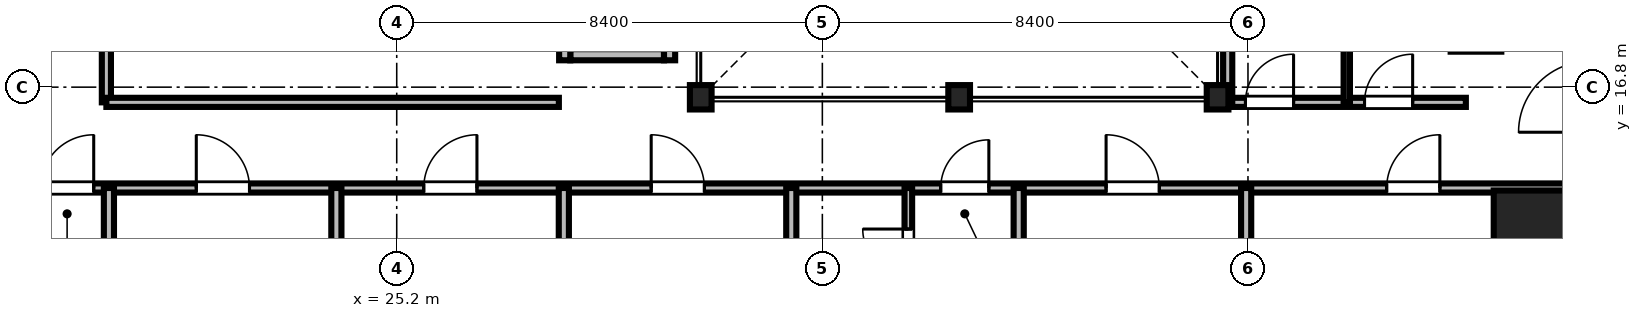
"""IFC4 building model, lengths in metres.
Left out: names, types, materials, properties, quantities, classifications, styles, units other than length and angle.
Written with IfcOpenShell. Run it as: python <this file> out.ifc"""

import sys

from ifc_helpers import new_model, si_unit, direction, frame, frame_2d, origin, origin_2d, place, context, subcontext, project, spatial, rectangle, i_section, extrude, source, transform, mapped, element, fill, save


model = new_model("IFC4")
c1 = context("Model", 3, precision=1e-05, world=origin(), true_north=direction((0.0, 1.0)))
c2 = subcontext(c1, "Body", "Model", "MODEL_VIEW")
j1 = project(units=[si_unit("LENGTHUNIT", "METRE"), si_unit("PLANEANGLEUNIT", "RADIAN")], contexts=[c1])
p1 = place(None, origin())
s1 = spatial("IfcSite", under=j1, at=p1, CompositionType="ELEMENT")
p2 = place(p1, origin())
s2 = spatial("IfcBuilding", under=s1, at=p2, CompositionType="ELEMENT")
p3 = place(p2, frame((0.0, 0.0, 86.0)))
s3 = spatial("IfcBuildingStorey", under=s2, at=p3, CompositionType="ELEMENT", Elevation=86.0)
m1 = source(origin(), c2, "Body", "SweptSolid", [
    extrude(i_section(OverallWidth=0.428, OverallDepth=0.481, WebThickness=0.04, FlangeThickness=0.063, FilletRadius=0.015, at=origin_2d()), origin(), (0.0, 0.0, 1.0), 3.41),
])
for number, where, z_axis, x_axis in (
    (1, (31.2, 16.6, 0.0), (0.0, 0.0, 1.0), (1.0, 0.0, 0.0)),
    (2, (36.3, 16.6, 0.0), (0.0, 0.0, 1.0), (1.0, 0.0, 0.0)),
    (3, (41.4, 16.6, 0.0), (0.0, 0.0, 1.0), (1.0, 0.0, 0.0)),
):
    element("IfcColumn", number, at=place(p3, frame(where, z_axis=z_axis, x_axis=x_axis)), inside=s3, PredefinedType="COLUMN", context=c2, shape_type="MappedRepresentation", body=[
        mapped(m1, transform((0.0, 0.0, 0.0), scale=1.0)),
    ])
m2 = source(origin(), c2, "Body", "SweptSolid", [
    extrude(rectangle(XDim=1.8, YDim=1.8, at=origin_2d()), origin(), (0.0, 0.0, 1.0), 3.41),
])
p4 = place(p3, frame((47.75, 13.86, 0.0), z_axis=(0.0, 0.0, 1.0), x_axis=(1.0, 0.0, 0.0)))
e4 = element("IfcColumn", 4, at=p4, inside=s3, PredefinedType="COLUMN", context=c2, shape_type="MappedRepresentation", body=[
    mapped(m2, transform((0.0, 0.0, 0.0), scale=1.0)),
])
m3 = source(origin(), c2, "Body", "SweptSolid", [
    extrude(rectangle(XDim=1.85, YDim=0.22, at=frame_2d((0.925, 0.0))), origin(), (0.0, 0.0, 1.0), 3.41),
])
p5 = place(p3, frame((28.625, 17.44, 0.0), z_axis=(0.0, 0.0, 1.0), x_axis=(1.0, 0.0, 0.0)))
e5 = element("IfcWall", 5, at=p5, inside=s3, PredefinedType="SOLIDWALL", context=c2, shape_type="MappedRepresentation", body=[
    mapped(m3, transform((0.0, 0.0, 0.0), scale=1.0)),
])
m4 = source(origin(), c2, "Body", "SweptSolid", [
    extrude(rectangle(XDim=2.54, YDim=0.22, at=frame_2d((1.27, 0.0))), origin(), (0.0, 0.0, 1.0), 3.41),
])
for number, where, z_axis, x_axis in (
    (6, (28.515, 17.33, 0.0), (0.0, 0.0, 1.0), (0.0, 1.0, 0.0)),
    (7, (30.585, 17.33, 0.0), (0.0, 0.0, 1.0), (0.0, 1.0, 0.0)),
):
    element("IfcWall", number, at=place(p3, frame(where, z_axis=z_axis, x_axis=x_axis)), inside=s3, PredefinedType="SOLIDWALL", context=c2, shape_type="MappedRepresentation", body=[
        mapped(m4, transform((0.0, 0.0, 0.0), scale=1.0)),
    ])
m5 = source(origin(), c2, "Body", "SweptSolid", [
    extrude(rectangle(XDim=46.156, YDim=0.18, at=frame_2d((23.078, 0.0))), origin(), (0.0, 0.0, 1.0), 2.652),
])
p6 = place(p3, frame((2.422, 14.81, 0.0), z_axis=(0.0, 0.0, 1.0), x_axis=(1.0, 0.0, 0.0)))
e8 = element("IfcWall", 8, at=p6, inside=s3, PredefinedType="PARTITIONING", context=c2, shape_type="MappedRepresentation", body=[
    mapped(m5, transform((0.0, 0.0, 0.0), scale=1.0)),
])
m6 = source(origin(), c2, "Body", "SweptSolid", [
    extrude(rectangle(XDim=1.05, YDim=2.2, at=frame_2d((0.525, 1.1))), frame((0.0, 0.1, 0.0), z_axis=(0.0, -1.0, 0.0), x_axis=(1.0, 0.0, 0.0)), (0.0, 0.0, 1.0), 0.2),
])
p7 = place(p6, frame((15.748, 0.0, 0.0)))
e9 = element("IfcOpeningElement", 9, at=p7, cuts=e8, PredefinedType="OPENING", context=c2, shape_type="MappedRepresentation", body=[
    mapped(m6, transform((0.0, 0.0, 0.0), scale=1.0)),
])
p8 = place(p6, frame((18.823, 0.0, 0.0)))
e10 = element("IfcOpeningElement", 10, at=p8, cuts=e8, PredefinedType="OPENING", context=c2, shape_type="MappedRepresentation", body=[
    mapped(m6, transform((0.0, 0.0, 0.0), scale=1.0)),
])
p9 = place(p6, frame((23.311, 0.0, 0.0)))
e11 = element("IfcOpeningElement", 11, at=p9, cuts=e8, PredefinedType="OPENING", context=c2, shape_type="MappedRepresentation", body=[
    mapped(m6, transform((0.0, 0.0, 0.0), scale=1.0)),
])
p10 = place(p6, frame((27.8, 0.0, 0.0)))
e12 = element("IfcOpeningElement", 12, at=p10, cuts=e8, PredefinedType="OPENING", context=c2, shape_type="MappedRepresentation", body=[
    mapped(m6, transform((0.0, 0.0, 0.0), scale=1.0)),
])
m7 = source(origin(), c2, "Body", "SweptSolid", [
    extrude(rectangle(XDim=0.95, YDim=2.15, at=frame_2d((0.475, 1.075))), frame((0.0, 0.1, 0.0), z_axis=(0.0, -1.0, 0.0), x_axis=(1.0, 0.0, 0.0)), (0.0, 0.0, 1.0), 0.2),
])
p11 = place(p6, frame((33.514, 0.0, 0.0)))
e13 = element("IfcOpeningElement", 13, at=p11, cuts=e8, PredefinedType="OPENING", context=c2, shape_type="MappedRepresentation", body=[
    mapped(m7, transform((0.0, 0.0, 0.0), scale=1.0)),
])
p12 = place(p6, frame((36.778, 0.0, 0.0)))
e14 = element("IfcOpeningElement", 14, at=p12, cuts=e8, PredefinedType="OPENING", context=c2, shape_type="MappedRepresentation", body=[
    mapped(m6, transform((0.0, 0.0, 0.0), scale=1.0)),
])
p13 = place(p6, frame((42.315, 0.0, 0.0)))
e15 = element("IfcOpeningElement", 15, at=p13, cuts=e8, PredefinedType="OPENING", context=c2, shape_type="MappedRepresentation", body=[
    mapped(m6, transform((0.0, 0.0, 0.0), scale=1.0)),
])
m8 = source(origin(), c2, "Body", "SweptSolid", [
    extrude(rectangle(XDim=5.4, YDim=0.18, at=frame_2d((2.7, 0.0))), origin(), (0.0, 0.0, 1.0), 2.802),
])
p14 = place(p3, frame((19.47, 16.5, 0.0), z_axis=(0.0, 0.0, 1.0), x_axis=(0.0, 1.0, 0.0)))
e16 = element("IfcWall", 16, at=p14, inside=s3, PredefinedType="PARTITIONING", context=c2, shape_type="MappedRepresentation", body=[
    mapped(m8, transform((0.0, 0.0, 0.0), scale=1.0)),
])
p15 = place(p14, frame((2.0, 0.0, 0.0)))
e17 = element("IfcOpeningElement", 17, at=p15, cuts=e16, PredefinedType="OPENING", context=c2, shape_type="MappedRepresentation", body=[
    mapped(m6, transform((0.0, 0.0, 0.0), scale=1.0)),
])
m9 = source(origin(), c2, "Body", "SweptSolid", [
    extrude(rectangle(XDim=4.7, YDim=0.18, at=frame_2d((2.35, 0.0))), origin(), (0.0, 0.0, 1.0), 2.802),
])
p16 = place(p3, frame((41.6, 16.5, 0.0), z_axis=(0.0, 0.0, 1.0), x_axis=(1.0, 0.0, 0.0)))
e18 = element("IfcWall", 18, at=p16, inside=s3, PredefinedType="PARTITIONING", context=c2, shape_type="MappedRepresentation", body=[
    mapped(m9, transform((0.0, 0.0, 0.0), scale=1.0)),
])
p17 = place(p16, frame((0.35, 0.0, 0.0)))
e19 = element("IfcOpeningElement", 19, at=p17, cuts=e18, PredefinedType="OPENING", context=c2, shape_type="MappedRepresentation", body=[
    mapped(m7, transform((0.0, 0.0, 0.0), scale=1.0)),
])
p18 = place(p16, frame((2.7, 0.0, 0.0)))
e20 = element("IfcOpeningElement", 20, at=p18, cuts=e18, PredefinedType="OPENING", context=c2, shape_type="MappedRepresentation", body=[
    mapped(m7, transform((0.0, 0.0, 0.0), scale=1.0)),
])
m10 = source(origin(), c2, "Body", "SweptSolid", [
    extrude(rectangle(XDim=2.36, YDim=0.15, at=frame_2d((1.18, 0.0))), origin(), (0.0, 0.0, 1.0), 2.802),
])
p19 = place(p3, frame((35.297, 12.45, 0.0), z_axis=(0.0, 0.0, 1.0), x_axis=(0.0, 1.0, 0.0)))
e21 = element("IfcWall", 21, at=p19, inside=s3, PredefinedType="PARTITIONING", context=c2, shape_type="MappedRepresentation", body=[
    mapped(m10, transform((0.0, 0.0, 0.0), scale=1.0)),
])
m11 = source(origin(), c2, "Body", "SweptSolid", [
    extrude(rectangle(XDim=0.9, YDim=2.1, at=frame_2d((0.45, 1.05))), frame((0.0, 0.085, 0.0), z_axis=(0.0, -1.0, 0.0), x_axis=(1.0, 0.0, 0.0)), (0.0, 0.0, 1.0), 0.17),
])
p20 = place(p19, frame((0.65, 0.0, 0.0)))
e22 = element("IfcOpeningElement", 22, at=p20, cuts=e21, PredefinedType="OPENING", context=c2, shape_type="MappedRepresentation", body=[
    mapped(m11, transform((0.0, 0.0, 0.0), scale=1.0)),
])
m12 = source(origin(), c2, "Body", "SweptSolid", [
    extrude(rectangle(XDim=12.688, YDim=0.2, at=frame_2d((6.344, 0.0))), origin(), (0.0, 0.0, 1.0), 2.652),
])
p21 = place(p3, frame((19.52, 2.122, 0.0), z_axis=(0.0, 0.0, 1.0), x_axis=(0.0, 1.0, 0.0)))
e23 = element("IfcWall", 23, at=p21, inside=s3, PredefinedType="PARTITIONING", context=c2, shape_type="MappedRepresentation", body=[
    mapped(m12, transform((0.0, 0.0, 0.0), scale=1.0)),
])
m13 = source(origin(), c2, "Body", "SweptSolid", [
    extrude(rectangle(XDim=12.88, YDim=0.2, at=frame_2d((6.44, 0.0))), origin(), (0.0, 0.0, 1.0), 2.652),
])
for number, where, z_axis, x_axis in (
    (24, (24.009, 1.93, 0.0), (0.0, 0.0, 1.0), (0.0, 1.0, 0.0)),
    (25, (28.498, 1.93, 0.0), (0.0, 0.0, 1.0), (0.0, 1.0, 0.0)),
):
    element("IfcWall", number, at=place(p3, frame(where, z_axis=z_axis, x_axis=x_axis)), inside=s3, PredefinedType="PARTITIONING", context=c2, shape_type="MappedRepresentation", body=[
        mapped(m13, transform((0.0, 0.0, 0.0), scale=1.0)),
    ])
for number, where, z_axis, x_axis in (
    (26, (32.987, 2.122, 0.0), (0.0, 0.0, 1.0), (0.0, 1.0, 0.0)),
    (27, (37.475, 2.122, 0.0), (0.0, 0.0, 1.0), (0.0, 1.0, 0.0)),
    (28, (41.964, 2.122, 0.0), (0.0, 0.0, 1.0), (0.0, 1.0, 0.0)),
):
    element("IfcWall", number, at=place(p3, frame(where, z_axis=z_axis, x_axis=x_axis)), inside=s3, PredefinedType="PARTITIONING", context=c2, shape_type="MappedRepresentation", body=[
        mapped(m12, transform((0.0, 0.0, 0.0), scale=1.0)),
    ])
m14 = source(origin(), c2, "Body", "SweptSolid", [
    extrude(rectangle(XDim=8.93, YDim=0.18, at=frame_2d((4.465, 0.0))), origin(), (0.0, 0.0, 1.0), 2.802),
])
p22 = place(p3, frame((19.47, 16.5, 0.0), z_axis=(0.0, 0.0, 1.0), x_axis=(1.0, 0.0, 0.0)))
e29 = element("IfcWall", 29, at=p22, inside=s3, PredefinedType="PARTITIONING", context=c2, shape_type="MappedRepresentation", body=[
    mapped(m14, transform((0.0, 0.0, 0.0), scale=1.0)),
])
m15 = source(origin(), c2, "Body", "SweptSolid", [
    extrude(rectangle(XDim=7.15, YDim=0.18, at=frame_2d((3.575, 0.0))), origin(), (0.0, 0.0, 1.0), 2.802),
])
p23 = place(p3, frame((41.6, 16.5, 0.0), z_axis=(0.0, 0.0, 1.0), x_axis=(0.0, 1.0, 0.0)))
e30 = element("IfcWall", 30, at=p23, inside=s3, PredefinedType="PARTITIONING", context=c2, shape_type="MappedRepresentation", body=[
    mapped(m15, transform((0.0, 0.0, 0.0), scale=1.0)),
])
m16 = source(origin(), c2, "Body", "SweptSolid", [
    extrude(rectangle(XDim=7.15, YDim=0.125, at=frame_2d((3.575, 0.0))), origin(), (0.0, 0.0, 1.0), 2.802),
])
p24 = place(p3, frame((43.95, 16.5, 0.0), z_axis=(0.0, 0.0, 1.0), x_axis=(0.0, 1.0, 0.0)))
e31 = element("IfcWall", 31, at=p24, inside=s3, PredefinedType="PARTITIONING", context=c2, shape_type="MappedRepresentation", body=[
    mapped(m16, transform((0.0, 0.0, 0.0), scale=1.0)),
])
m17 = source(origin(), c2, "Body", "SweptSolid", [
    extrude(rectangle(XDim=1.05, YDim=2.2, at=frame_2d((0.525, 1.1))), frame((0.0, 0.025, 0.0), z_axis=(0.0, -1.0, 0.0), x_axis=(1.0, 0.0, 0.0)), (0.0, 0.0, 1.0), 0.05),
])
p25 = place(p7, origin())
e32 = element("IfcDoor", 32, at=p25, inside=s3, OperationType="SINGLE_SWING_RIGHT", PredefinedType="DOOR", context=c2, shape_type="MappedRepresentation", body=[
    mapped(m17, transform((0.0, 0.0, 0.0), scale=1.0)),
])
fill(e9, e32)
p26 = place(p8, origin())
e33 = element("IfcDoor", 33, at=p26, inside=s3, OperationType="SINGLE_SWING_LEFT", PredefinedType="DOOR", context=c2, shape_type="MappedRepresentation", body=[
    mapped(m17, transform((0.0, 0.0, 0.0), scale=1.0)),
])
fill(e10, e33)
p27 = place(p9, origin())
e34 = element("IfcDoor", 34, at=p27, inside=s3, OperationType="SINGLE_SWING_RIGHT", PredefinedType="DOOR", context=c2, shape_type="MappedRepresentation", body=[
    mapped(m17, transform((0.0, 0.0, 0.0), scale=1.0)),
])
fill(e11, e34)
p28 = place(p10, origin())
e35 = element("IfcDoor", 35, at=p28, inside=s3, OperationType="SINGLE_SWING_LEFT", PredefinedType="DOOR", context=c2, shape_type="MappedRepresentation", body=[
    mapped(m17, transform((0.0, 0.0, 0.0), scale=1.0)),
])
fill(e12, e35)
m18 = source(origin(), c2, "Body", "SweptSolid", [
    extrude(rectangle(XDim=0.95, YDim=2.15, at=frame_2d((0.475, 1.075))), frame((0.0, 0.025, 0.0), z_axis=(0.0, -1.0, 0.0), x_axis=(1.0, 0.0, 0.0)), (0.0, 0.0, 1.0), 0.05),
])
p29 = place(p11, origin())
e36 = element("IfcDoor", 36, at=p29, inside=s3, OperationType="SINGLE_SWING_RIGHT", PredefinedType="DOOR", context=c2, shape_type="MappedRepresentation", body=[
    mapped(m18, transform((0.0, 0.0, 0.0), scale=1.0)),
])
fill(e13, e36)
p30 = place(p12, origin())
e37 = element("IfcDoor", 37, at=p30, inside=s3, OperationType="SINGLE_SWING_LEFT", PredefinedType="DOOR", context=c2, shape_type="MappedRepresentation", body=[
    mapped(m17, transform((0.0, 0.0, 0.0), scale=1.0)),
])
fill(e14, e37)
p31 = place(p13, origin())
e38 = element("IfcDoor", 38, at=p31, inside=s3, OperationType="SINGLE_SWING_RIGHT", PredefinedType="DOOR", context=c2, shape_type="MappedRepresentation", body=[
    mapped(m17, transform((0.0, 0.0, 0.0), scale=1.0)),
])
fill(e15, e38)
p32 = place(p17, origin())
e39 = element("IfcDoor", 39, at=p32, inside=s3, OperationType="SINGLE_SWING_RIGHT", PredefinedType="DOOR", context=c2, shape_type="MappedRepresentation", body=[
    mapped(m18, transform((0.0, 0.0, 0.0), scale=1.0)),
])
fill(e19, e39)
p33 = place(p18, origin())
e40 = element("IfcDoor", 40, at=p33, inside=s3, OperationType="SINGLE_SWING_RIGHT", PredefinedType="DOOR", context=c2, shape_type="MappedRepresentation", body=[
    mapped(m18, transform((0.0, 0.0, 0.0), scale=1.0)),
])
fill(e20, e40)
m19 = source(origin(), c2, "Body", "SweptSolid", [
    extrude(rectangle(XDim=0.9, YDim=2.1, at=frame_2d((0.45, 1.05))), frame((0.0, 0.025, 0.0), z_axis=(0.0, -1.0, 0.0), x_axis=(1.0, 0.0, 0.0)), (0.0, 0.0, 1.0), 0.05),
])
p34 = place(p20, origin())
e41 = element("IfcDoor", 41, at=p34, inside=s3, OperationType="SINGLE_SWING_RIGHT", PredefinedType="DOOR", context=c2, shape_type="MappedRepresentation", body=[
    mapped(m19, transform((0.0, 0.0, 0.0), scale=1.0)),
])
fill(e22, e41)
save(model, sys.argv[1])
